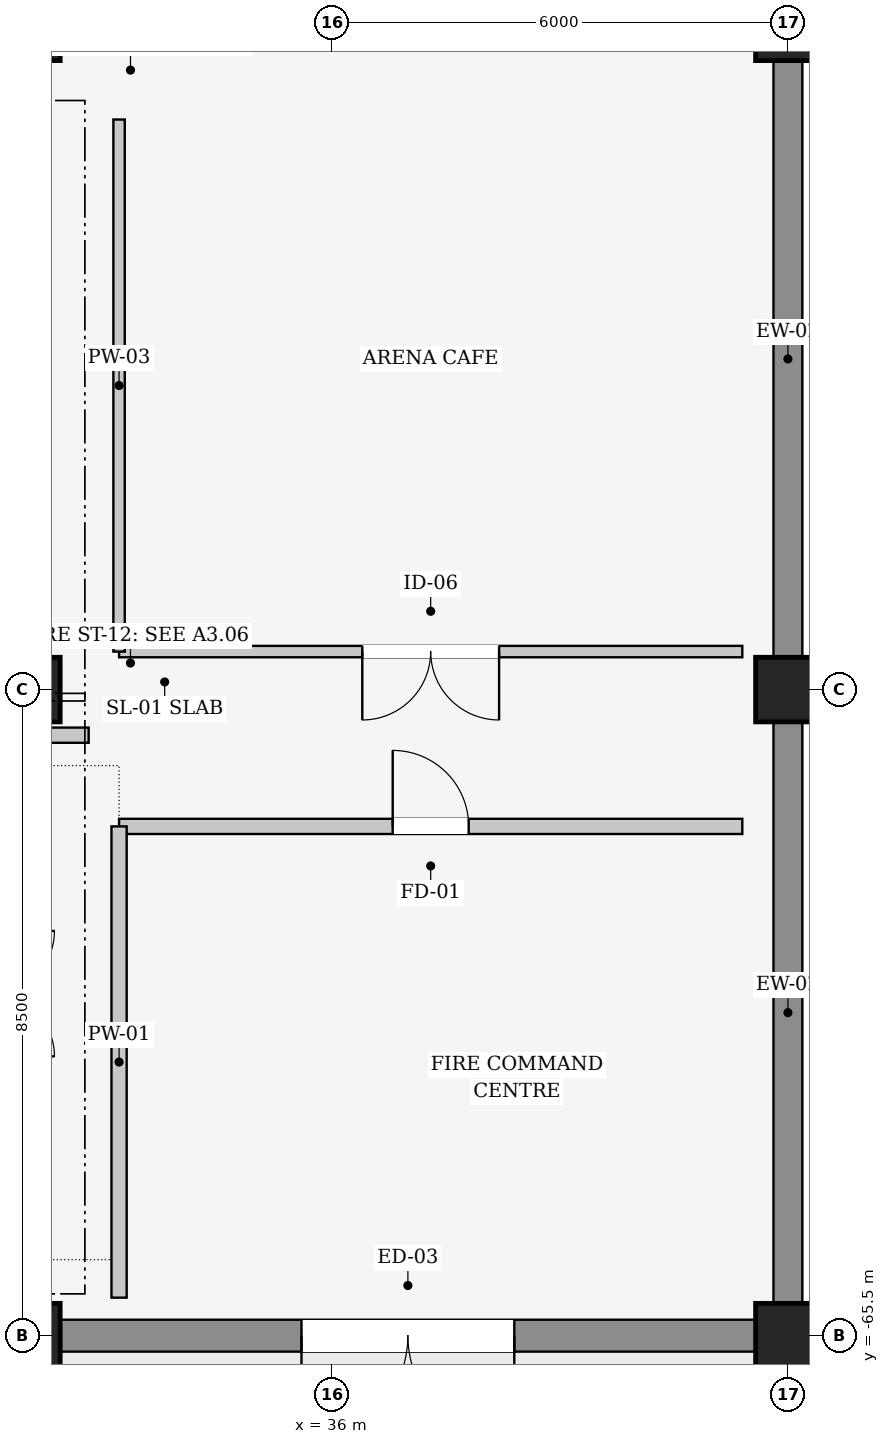
"""IFC4 building model, lengths in metres.
Left out: names, types, materials, properties, quantities, classifications, styles, units other than length and angle.
Written with IfcOpenShell. Run it as: python <this file> out.ifc"""

import sys

from ifc_helpers import new_model, si_unit, direction, frame, frame_2d, origin, origin_2d, place, context, subcontext, project, spatial, rectangle, extrude, element, fill, save


model = new_model("IFC4")
c1 = context("Model", 3, precision=1e-05, world=origin(), true_north=direction((0.0, 1.0)))
c2 = subcontext(c1, "Body", "Model", "MODEL_VIEW")
j1 = project(units=[si_unit("LENGTHUNIT", "METRE"), si_unit("PLANEANGLEUNIT", "RADIAN")], contexts=[c1])
p1 = place(None, origin())
s1 = spatial("IfcSite", under=j1, at=p1, CompositionType="ELEMENT")
p2 = place(p1, origin())
s2 = spatial("IfcBuilding", under=s1, at=p2, CompositionType="ELEMENT")
p3 = place(p2, origin())
s3 = spatial("IfcBuildingStorey", under=s2, at=p3, CompositionType="ELEMENT", Elevation=0.0)
for number, where, z_axis, x_axis in (
    (1, (32.0, -65.5, 0.0), (0.0, 0.0, 1.0), (1.0, 0.0, 0.0)),
    (2, (32.0, -57.0, 0.0), (0.0, 0.0, 1.0), (1.0, 0.0, 0.0)),
    (3, (32.0, -48.3, 0.0), (0.0, 0.0, 1.0), (1.0, 0.0, 0.0)),
    (4, (42.0, -65.5, 0.0), (0.0, 0.0, 1.0), (1.0, 0.0, 0.0)),
    (5, (42.0, -57.0, 0.0), (0.0, 0.0, 1.0), (1.0, 0.0, 0.0)),
    (6, (42.0, -48.3, 0.0), (0.0, 0.0, 1.0), (1.0, 0.0, 0.0)),
):
    element("IfcColumn", number, at=place(p3, frame(where, z_axis=z_axis, x_axis=x_axis)), inside=s3, PredefinedType="COLUMN", context=c2, shape_type="SweptSolid", body=[
        extrude(rectangle(XDim=0.85, YDim=0.85, at=origin_2d()), origin(), (0.0, 0.0, 1.0), 6.0),
    ])
p4 = place(p3, frame((41.593, -65.5, 0.0), z_axis=(0.0, 0.0, 1.0), x_axis=(-1.0, 0.0, 0.0)))
e7 = element("IfcWall", 7, at=p4, inside=s3, PredefinedType="SOLIDWALL", context=c2, shape_type="SweptSolid", body=[
    extrude(rectangle(XDim=9.186, YDim=0.42, at=frame_2d((4.593, 0.0))), origin(), (0.0, 0.0, 1.0), 4.84),
])
p5 = place(p4, frame((3.193, 0.0, 0.0)))
e8 = element("IfcOpeningElement", 8, at=p5, cuts=e7, PredefinedType="OPENING", context=c2, shape_type="SweptSolid", body=[
    extrude(rectangle(XDim=2.8, YDim=3.2, at=frame_2d((1.4, 1.6))), frame((0.0, 0.22, 0.0), z_axis=(0.0, -1.0, 0.0), x_axis=(1.0, 0.0, 0.0)), (0.0, 0.0, 1.0), 0.44),
])
p6 = place(p3, frame((42.0, -57.407, 0.0), z_axis=(0.0, 0.0, 1.0), x_axis=(0.0, -1.0, 0.0)))
e9 = element("IfcWall", 9, at=p6, inside=s3, PredefinedType="SOLIDWALL", context=c2, shape_type="SweptSolid", body=[
    extrude(rectangle(XDim=7.686, YDim=0.38, at=frame_2d((3.843, 0.0))), origin(), (0.0, 0.0, 1.0), 4.84),
])
p7 = place(p3, frame((42.0, -48.707, 0.0), z_axis=(0.0, 0.0, 1.0), x_axis=(0.0, -1.0, 0.0)))
e10 = element("IfcWall", 10, at=p7, inside=s3, PredefinedType="SOLIDWALL", context=c2, shape_type="SweptSolid", body=[
    extrude(rectangle(XDim=7.886, YDim=0.38, at=frame_2d((3.943, 0.0))), origin(), (0.0, 0.0, 1.0), 4.84),
])
p8 = place(p3, frame((41.4, -56.5, 0.0), z_axis=(0.0, 0.0, 1.0), x_axis=(-1.0, 0.0, 0.0)))
e11 = element("IfcWall", 11, at=p8, inside=s3, PredefinedType="PARTITIONING", context=c2, shape_type="SweptSolid", body=[
    extrude(rectangle(XDim=8.2, YDim=0.15, at=frame_2d((4.1, 0.0))), origin(), (0.0, 0.0, 1.0), 4.825),
])
p9 = place(p8, frame((3.2, 0.0, 0.0)))
e12 = element("IfcOpeningElement", 12, at=p9, cuts=e11, PredefinedType="OPENING", context=c2, shape_type="SweptSolid", body=[
    extrude(rectangle(XDim=1.8, YDim=2.2, at=frame_2d((0.9, 1.1))), frame((0.0, 0.085, 0.0), z_axis=(0.0, -1.0, 0.0), x_axis=(1.0, 0.0, 0.0)), (0.0, 0.0, 1.0), 0.17),
])
p10 = place(p3, frame((33.2, -56.5, 0.0), z_axis=(0.0, 0.0, 1.0), x_axis=(0.0, 1.0, 0.0)))
e13 = element("IfcWall", 13, at=p10, inside=s3, PredefinedType="PARTITIONING", context=c2, shape_type="SweptSolid", body=[
    extrude(rectangle(XDim=7.0, YDim=0.15, at=frame_2d((3.5, 0.0))), origin(), (0.0, 0.0, 1.0), 4.825),
])
p11 = place(p3, frame((33.2, -58.8, 0.0), z_axis=(0.0, 0.0, 1.0), x_axis=(1.0, 0.0, 0.0)))
e14 = element("IfcWall", 14, at=p11, inside=s3, PredefinedType="PARTITIONING", context=c2, shape_type="SweptSolid", body=[
    extrude(rectangle(XDim=8.2, YDim=0.2, at=frame_2d((4.1, 0.0))), origin(), (0.0, 0.0, 1.0), 5.64),
])
p12 = place(p11, frame((3.6, 0.0, 0.0)))
e15 = element("IfcOpeningElement", 15, at=p12, cuts=e14, PredefinedType="OPENING", context=c2, shape_type="SweptSolid", body=[
    extrude(rectangle(XDim=1.0, YDim=2.15, at=frame_2d((0.5, 1.075))), frame((0.0, 0.11, 0.0), z_axis=(0.0, -1.0, 0.0), x_axis=(1.0, 0.0, 0.0)), (0.0, 0.0, 1.0), 0.22),
])
p13 = place(p3, frame((33.2, -65.0, 0.0), z_axis=(0.0, 0.0, 1.0), x_axis=(0.0, 1.0, 0.0)))
e16 = element("IfcWall", 16, at=p13, inside=s3, PredefinedType="PARTITIONING", context=c2, shape_type="SweptSolid", body=[
    extrude(rectangle(XDim=6.2, YDim=0.2, at=frame_2d((3.1, 0.0))), origin(), (0.0, 0.0, 1.0), 4.825),
])
p14 = place(p3, frame((20.6, -57.6, 0.0), z_axis=(0.0, 0.0, 1.0), x_axis=(1.0, 0.0, 0.0)))
e17 = element("IfcWall", 17, at=p14, inside=s3, PredefinedType="PARTITIONING", context=c2, shape_type="SweptSolid", body=[
    extrude(rectangle(XDim=12.2, YDim=0.2, at=frame_2d((6.1, 0.0))), origin(), (0.0, 0.0, 1.0), 5.025),
])
p15 = place(p14, frame((5.3, 0.0, 0.0)))
e18 = element("IfcOpeningElement", 18, at=p15, cuts=e17, PredefinedType="OPENING", context=c2, shape_type="SweptSolid", body=[
    extrude(rectangle(XDim=1.6, YDim=2.2, at=frame_2d((0.8, 1.1))), frame((0.0, 0.11, 0.0), z_axis=(0.0, -1.0, 0.0), x_axis=(1.0, 0.0, 0.0)), (0.0, 0.0, 1.0), 0.22),
])
p16 = place(p5, origin())
e19 = element("IfcDoor", 19, at=p16, inside=s3, OperationType="DOUBLE_DOOR_SINGLE_SWING", PredefinedType="DOOR", context=c2, shape_type="SweptSolid", body=[
    extrude(rectangle(XDim=2.8, YDim=3.2, at=frame_2d((1.4, 1.6))), frame((0.0, 0.025, 0.0), z_axis=(0.0, -1.0, 0.0), x_axis=(1.0, 0.0, 0.0)), (0.0, 0.0, 1.0), 0.05),
])
fill(e8, e19)
p17 = place(p9, origin())
e20 = element("IfcDoor", 20, at=p17, inside=s3, OperationType="DOUBLE_DOOR_SINGLE_SWING", PredefinedType="DOOR", context=c2, shape_type="SweptSolid", body=[
    extrude(rectangle(XDim=1.8, YDim=2.2, at=frame_2d((0.9, 1.1))), frame((0.0, 0.025, 0.0), z_axis=(0.0, -1.0, 0.0), x_axis=(1.0, 0.0, 0.0)), (0.0, 0.0, 1.0), 0.05),
])
fill(e12, e20)
p18 = place(p12, origin())
e21 = element("IfcDoor", 21, at=p18, inside=s3, OperationType="SINGLE_SWING_LEFT", PredefinedType="DOOR", context=c2, shape_type="SweptSolid", body=[
    extrude(rectangle(XDim=1.0, YDim=2.15, at=frame_2d((0.5, 1.075))), frame((0.0, 0.025, 0.0), z_axis=(0.0, -1.0, 0.0), x_axis=(1.0, 0.0, 0.0)), (0.0, 0.0, 1.0), 0.05),
])
fill(e15, e21)
save(model, sys.argv[1])
